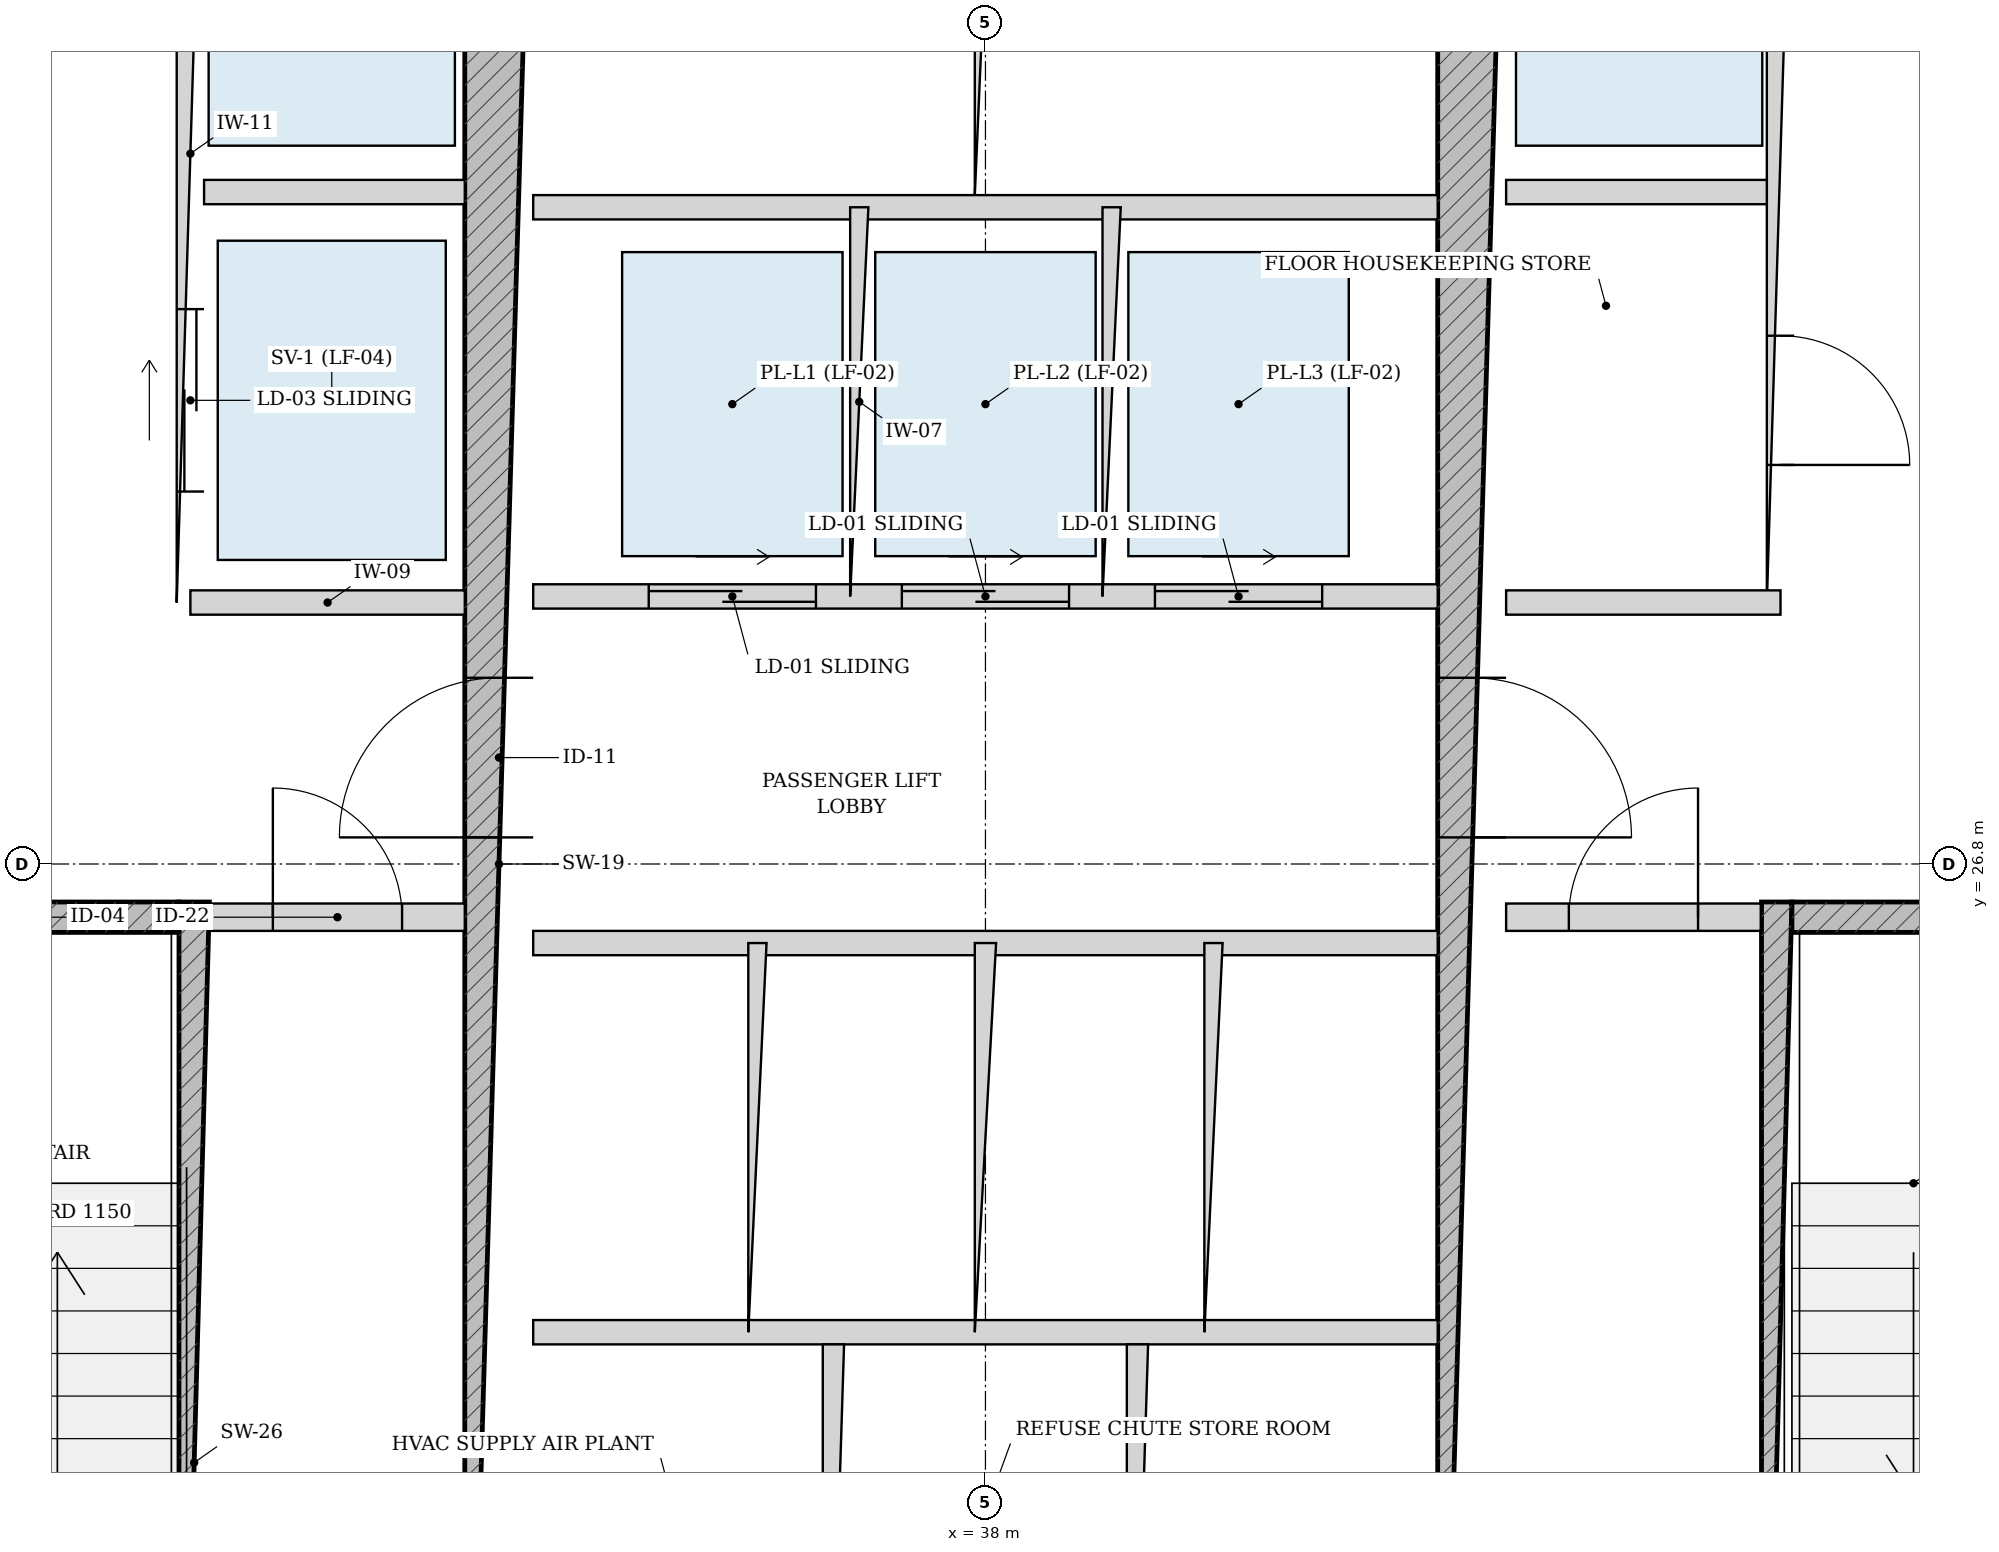
"""IFC4 building model, lengths in metres.
Left out: names, types, materials, properties, quantities, classifications, styles, units other than length and angle.
Written with IfcOpenShell. Run it as: python <this file> out.ifc"""

import sys

from ifc_helpers import new_model, si_unit, direction, frame, frame_2d, origin, place, context, subcontext, project, spatial, rectangle, extrude, source, transform, mapped, element, fill, save


model = new_model("IFC4")
c1 = context("Model", 3, precision=1e-05, world=origin(), true_north=direction((-0.2419218956, 0.970295726276)))
c2 = subcontext(c1, "Body", "Model", "MODEL_VIEW")
j1 = project(units=[si_unit("LENGTHUNIT", "METRE"), si_unit("PLANEANGLEUNIT", "RADIAN")], contexts=[c1])
p1 = place(None, origin())
s1 = spatial("IfcSite", under=j1, at=p1, CompositionType="ELEMENT")
p2 = place(p1, origin())
s2 = spatial("IfcBuilding", under=s1, at=p2, CompositionType="ELEMENT")
p3 = place(p2, frame((0.0, 0.0, 67.2)))
s3 = spatial("IfcBuildingStorey", under=s2, at=p3, CompositionType="ELEMENT", Elevation=67.2)
p4 = place(p3, frame((32.795, 19.175, 0.0), z_axis=(0.0, 0.0, 1.0), x_axis=(0.0, 1.0, 0.0)))
e1 = element("IfcWall", 1, at=p4, inside=s3, PredefinedType="SOLIDWALL", context=c2, shape_type="SweptSolid", body=[
    extrude(rectangle(XDim=7.375, YDim=0.2, at=frame_2d((3.688, 0.0))), origin(), (0.0, 0.0, 1.0), 3.32),
])
p5 = place(p3, frame((29.375, 26.45, 0.0), z_axis=(0.0, 0.0, 1.0), x_axis=(1.0, 0.0, 0.0)))
e2 = element("IfcWall", 2, at=p5, inside=s3, PredefinedType="SOLIDWALL", context=c2, shape_type="SweptSolid", body=[
    extrude(rectangle(XDim=3.32, YDim=0.2, at=frame_2d((1.66, 0.0))), origin(), (0.0, 0.0, 1.0), 3.32),
])
p6 = place(p5, frame((1.185, 0.0, 0.0)))
e3 = element("IfcOpeningElement", 3, at=p6, cuts=e2, PredefinedType="OPENING", context=c2, shape_type="SweptSolid", body=[
    extrude(rectangle(XDim=0.95, YDim=2.15, at=frame_2d((0.475, 1.075))), frame((0.0, 0.11, 0.0), z_axis=(0.0, -1.0, 0.0), x_axis=(1.0, 0.0, 0.0)), (0.0, 0.0, 1.0), 0.22),
])
p7 = place(p3, frame((43.205, 19.175, 0.0), z_axis=(0.0, 0.0, 1.0), x_axis=(0.0, 1.0, 0.0)))
e4 = element("IfcWall", 4, at=p7, inside=s3, PredefinedType="SOLIDWALL", context=c2, shape_type="SweptSolid", body=[
    extrude(rectangle(XDim=7.375, YDim=0.2, at=frame_2d((3.688, 0.0))), origin(), (0.0, 0.0, 1.0), 3.32),
])
p8 = place(p3, frame((43.305, 26.45, 0.0), z_axis=(0.0, 0.0, 1.0), x_axis=(1.0, 0.0, 0.0)))
e5 = element("IfcWall", 5, at=p8, inside=s3, PredefinedType="SOLIDWALL", context=c2, shape_type="SweptSolid", body=[
    extrude(rectangle(XDim=3.32, YDim=0.2, at=frame_2d((1.66, 0.0))), origin(), (0.0, 0.0, 1.0), 3.32),
])
p9 = place(p8, frame((1.185, 0.0, 0.0)))
e6 = element("IfcOpeningElement", 6, at=p9, cuts=e5, PredefinedType="OPENING", context=c2, shape_type="SweptSolid", body=[
    extrude(rectangle(XDim=0.95, YDim=2.15, at=frame_2d((0.475, 1.075))), frame((0.0, 0.11, 0.0), z_axis=(0.0, -1.0, 0.0), x_axis=(1.0, 0.0, 0.0)), (0.0, 0.0, 1.0), 0.22),
])
p10 = place(p3, frame((34.8, 19.175, 0.0), z_axis=(0.0, 0.0, 1.0), x_axis=(0.0, 1.0, 0.0)))
e7 = element("IfcWall", 7, at=p10, inside=s3, PredefinedType="SHEAR", context=c2, shape_type="SweptSolid", body=[
    extrude(rectangle(XDim=15.25, YDim=0.45, at=frame_2d((7.625, 0.0))), origin(), (0.0, 0.0, 1.0), 3.32),
])
p11 = place(p10, frame((7.8, 0.0, 0.0)))
e8 = element("IfcOpeningElement", 8, at=p11, cuts=e7, PredefinedType="OPENING", context=c2, shape_type="SweptSolid", body=[
    extrude(rectangle(XDim=1.05, YDim=2.15, at=frame_2d((0.525, 1.075))), frame((0.0, 0.235, 0.0), z_axis=(0.0, -1.0, 0.0), x_axis=(1.0, 0.0, 0.0)), (0.0, 0.0, 1.0), 0.47),
])
p12 = place(p3, frame((41.2, 19.175, 0.0), z_axis=(0.0, 0.0, 1.0), x_axis=(0.0, 1.0, 0.0)))
e9 = element("IfcWall", 9, at=p12, inside=s3, PredefinedType="SHEAR", context=c2, shape_type="SweptSolid", body=[
    extrude(rectangle(XDim=15.25, YDim=0.45, at=frame_2d((7.625, 0.0))), origin(), (0.0, 0.0, 1.0), 3.32),
])
p13 = place(p12, frame((7.8, 0.0, 0.0)))
e10 = element("IfcOpeningElement", 10, at=p13, cuts=e9, PredefinedType="OPENING", context=c2, shape_type="SweptSolid", body=[
    extrude(rectangle(XDim=1.05, YDim=2.15, at=frame_2d((0.525, 1.075))), frame((0.0, 0.235, 0.0), z_axis=(0.0, -1.0, 0.0), x_axis=(1.0, 0.0, 0.0)), (0.0, 0.0, 1.0), 0.47),
])
p14 = place(p3, frame((32.9, 26.45, 0.0), z_axis=(0.0, 0.0, 1.0), x_axis=(1.0, 0.0, 0.0)))
e11 = element("IfcWall", 11, at=p14, inside=s3, PredefinedType="PARTITIONING", context=c2, shape_type="SweptSolid", body=[
    extrude(rectangle(XDim=1.675, YDim=0.18, at=frame_2d((0.837, 0.0))), origin(), (0.0, 0.0, 1.0), 3.32),
])
p15 = place(p14, frame((0.413, 0.0, 0.0)))
e12 = element("IfcOpeningElement", 12, at=p15, cuts=e11, PredefinedType="OPENING", context=c2, shape_type="SweptSolid", body=[
    extrude(rectangle(XDim=0.85, YDim=2.1, at=frame_2d((0.425, 1.05))), frame((0.0, 0.1, 0.0), z_axis=(0.0, -1.0, 0.0), x_axis=(1.0, 0.0, 0.0)), (0.0, 0.0, 1.0), 0.2),
])
p16 = place(p3, frame((41.425, 26.45, 0.0), z_axis=(0.0, 0.0, 1.0), x_axis=(1.0, 0.0, 0.0)))
e13 = element("IfcWall", 13, at=p16, inside=s3, PredefinedType="PARTITIONING", context=c2, shape_type="SweptSolid", body=[
    extrude(rectangle(XDim=1.675, YDim=0.18, at=frame_2d((0.837, 0.0))), origin(), (0.0, 0.0, 1.0), 3.32),
])
p17 = place(p16, frame((0.413, 0.0, 0.0)))
e14 = element("IfcOpeningElement", 14, at=p17, cuts=e13, PredefinedType="OPENING", context=c2, shape_type="SweptSolid", body=[
    extrude(rectangle(XDim=0.85, YDim=2.1, at=frame_2d((0.425, 1.05))), frame((0.0, 0.1, 0.0), z_axis=(0.0, -1.0, 0.0), x_axis=(1.0, 0.0, 0.0)), (0.0, 0.0, 1.0), 0.2),
])
p18 = place(p3, frame((32.77, 28.52, 0.0), z_axis=(0.0, 0.0, 1.0), x_axis=(0.0, 1.0, 0.0)))
e15 = element("IfcWall", 15, at=p18, inside=s3, PredefinedType="PARTITIONING", context=c2, shape_type="SweptSolid", body=[
    extrude(rectangle(XDim=5.905, YDim=0.18, at=frame_2d((2.953, 0.0))), origin(), (0.0, 0.0, 1.0), 3.32),
])
p19 = place(p18, frame((3.655, 0.0, 0.0)))
e16 = element("IfcOpeningElement", 16, at=p19, cuts=e15, PredefinedType="OPENING", context=c2, shape_type="SweptSolid", body=[
    extrude(rectangle(XDim=1.15, YDim=2.2, at=frame_2d((0.575, 1.1))), frame((0.0, 0.1, 0.0), z_axis=(0.0, -1.0, 0.0), x_axis=(1.0, 0.0, 0.0)), (0.0, 0.0, 1.0), 0.2),
])
p20 = place(p18, frame((0.73, 0.0, 0.0)))
e17 = element("IfcOpeningElement", 17, at=p20, cuts=e15, PredefinedType="OPENING", context=c2, shape_type="SweptSolid", body=[
    extrude(rectangle(XDim=1.2, YDim=2.25, at=frame_2d((0.6, 1.125))), frame((0.0, 0.1, 0.0), z_axis=(0.0, -1.0, 0.0), x_axis=(1.0, 0.0, 0.0)), (0.0, 0.0, 1.0), 0.2),
])
p21 = place(p3, frame((32.86, 31.22, 0.0), z_axis=(0.0, 0.0, 1.0), x_axis=(1.0, 0.0, 0.0)))
e18 = element("IfcWall", 18, at=p21, inside=s3, PredefinedType="PARTITIONING", context=c2, shape_type="SweptSolid", body=[
    extrude(rectangle(XDim=1.715, YDim=0.16, at=frame_2d((0.857, 0.0))), origin(), (0.0, 0.0, 1.0), 3.32),
])
p22 = place(p3, frame((32.77, 28.52, 0.0), z_axis=(0.0, 0.0, 1.0), x_axis=(1.0, 0.0, 0.0)))
e19 = element("IfcWall", 19, at=p22, inside=s3, PredefinedType="PARTITIONING", context=c2, shape_type="SweptSolid", body=[
    extrude(rectangle(XDim=1.805, YDim=0.16, at=frame_2d((0.902, 0.0))), origin(), (0.0, 0.0, 1.0), 3.32),
])
p23 = place(p3, frame((43.23, 28.52, 0.0), z_axis=(0.0, 0.0, 1.0), x_axis=(0.0, 1.0, 0.0)))
e20 = element("IfcWall", 20, at=p23, inside=s3, PredefinedType="PARTITIONING", context=c2, shape_type="SweptSolid", body=[
    extrude(rectangle(XDim=5.905, YDim=0.18, at=frame_2d((2.953, 0.0))), origin(), (0.0, 0.0, 1.0), 3.32),
])
p24 = place(p23, frame((0.905, 0.0, 0.0)))
e21 = element("IfcOpeningElement", 21, at=p24, cuts=e20, PredefinedType="OPENING", context=c2, shape_type="SweptSolid", body=[
    extrude(rectangle(XDim=0.85, YDim=2.1, at=frame_2d((0.425, 1.05))), frame((0.0, 0.1, 0.0), z_axis=(0.0, -1.0, 0.0), x_axis=(1.0, 0.0, 0.0)), (0.0, 0.0, 1.0), 0.2),
])
p25 = place(p23, frame((3.655, 0.0, 0.0)))
e22 = element("IfcOpeningElement", 22, at=p25, cuts=e20, PredefinedType="OPENING", context=c2, shape_type="SweptSolid", body=[
    extrude(rectangle(XDim=1.15, YDim=2.2, at=frame_2d((0.575, 1.1))), frame((0.0, 0.1, 0.0), z_axis=(0.0, -1.0, 0.0), x_axis=(1.0, 0.0, 0.0)), (0.0, 0.0, 1.0), 0.2),
])
p26 = place(p3, frame((41.425, 31.22, 0.0), z_axis=(0.0, 0.0, 1.0), x_axis=(1.0, 0.0, 0.0)))
e23 = element("IfcWall", 23, at=p26, inside=s3, PredefinedType="PARTITIONING", context=c2, shape_type="SweptSolid", body=[
    extrude(rectangle(XDim=1.715, YDim=0.16, at=frame_2d((0.857, 0.0))), origin(), (0.0, 0.0, 1.0), 3.32),
])
p27 = place(p3, frame((41.425, 28.52, 0.0), z_axis=(0.0, 0.0, 1.0), x_axis=(1.0, 0.0, 0.0)))
e24 = element("IfcWall", 24, at=p27, inside=s3, PredefinedType="PARTITIONING", context=c2, shape_type="SweptSolid", body=[
    extrude(rectangle(XDim=1.805, YDim=0.16, at=frame_2d((0.902, 0.0))), origin(), (0.0, 0.0, 1.0), 3.32),
])
p28 = place(p3, frame((35.025, 28.56, 0.0), z_axis=(0.0, 0.0, 1.0), x_axis=(1.0, 0.0, 0.0)))
e25 = element("IfcWall", 25, at=p28, inside=s3, PredefinedType="PARTITIONING", context=c2, shape_type="SweptSolid", body=[
    extrude(rectangle(XDim=5.95, YDim=0.16, at=frame_2d((2.975, 0.0))), origin(), (0.0, 0.0, 1.0), 3.32),
])
p29 = place(p28, frame((0.76, 0.0, 0.0)))
e26 = element("IfcOpeningElement", 26, at=p29, cuts=e25, PredefinedType="OPENING", context=c2, shape_type="SweptSolid", body=[
    extrude(rectangle(XDim=1.1, YDim=2.2, at=frame_2d((0.55, 1.1))), frame((0.0, 0.09, 0.0), z_axis=(0.0, -1.0, 0.0), x_axis=(1.0, 0.0, 0.0)), (0.0, 0.0, 1.0), 0.18),
])
p30 = place(p28, frame((2.425, 0.0, 0.0)))
e27 = element("IfcOpeningElement", 27, at=p30, cuts=e25, PredefinedType="OPENING", context=c2, shape_type="SweptSolid", body=[
    extrude(rectangle(XDim=1.1, YDim=2.2, at=frame_2d((0.55, 1.1))), frame((0.0, 0.09, 0.0), z_axis=(0.0, -1.0, 0.0), x_axis=(1.0, 0.0, 0.0)), (0.0, 0.0, 1.0), 0.18),
])
p31 = place(p28, frame((4.09, 0.0, 0.0)))
e28 = element("IfcOpeningElement", 28, at=p31, cuts=e25, PredefinedType="OPENING", context=c2, shape_type="SweptSolid", body=[
    extrude(rectangle(XDim=1.1, YDim=2.2, at=frame_2d((0.55, 1.1))), frame((0.0, 0.09, 0.0), z_axis=(0.0, -1.0, 0.0), x_axis=(1.0, 0.0, 0.0)), (0.0, 0.0, 1.0), 0.18),
])
p32 = place(p3, frame((35.025, 31.12, 0.0), z_axis=(0.0, 0.0, 1.0), x_axis=(1.0, 0.0, 0.0)))
e29 = element("IfcWall", 29, at=p32, inside=s3, PredefinedType="PARTITIONING", context=c2, shape_type="SweptSolid", body=[
    extrude(rectangle(XDim=5.95, YDim=0.16, at=frame_2d((2.975, 0.0))), origin(), (0.0, 0.0, 1.0), 3.32),
])
for number, where, z_axis, x_axis in (
    (30, (37.17, 28.56, 0.0), (0.0, 0.0, 1.0), (0.0, 1.0, 0.0)),
    (31, (38.83, 28.56, 0.0), (0.0, 0.0, 1.0), (0.0, 1.0, 0.0)),
):
    element("IfcWall", number, at=place(p3, frame(where, z_axis=z_axis, x_axis=x_axis)), inside=s3, PredefinedType="PARTITIONING", context=c2, shape_type="SweptSolid", body=[
        extrude(rectangle(XDim=2.56, YDim=0.12, at=frame_2d((1.28, 0.0))), origin(), (0.0, 0.0, 1.0), 3.32),
    ])
p33 = place(p3, frame((38.0, 31.2, 0.0), z_axis=(0.0, 0.0, 1.0), x_axis=(0.0, 1.0, 0.0)))
e32 = element("IfcWall", 32, at=p33, inside=s3, PredefinedType="PARTITIONING", context=c2, shape_type="SweptSolid", body=[
    extrude(rectangle(XDim=3.225, YDim=0.14, at=frame_2d((1.613, 0.0))), origin(), (0.0, 0.0, 1.0), 3.32),
])
for number, where, z_axis, x_axis in (
    (33, (35.025, 26.28, 0.0), (0.0, 0.0, 1.0), (1.0, 0.0, 0.0)),
    (34, (35.025, 23.72, 0.0), (0.0, 0.0, 1.0), (1.0, 0.0, 0.0)),
):
    element("IfcWall", number, at=place(p3, frame(where, z_axis=z_axis, x_axis=x_axis)), inside=s3, PredefinedType="PARTITIONING", context=c2, shape_type="SweptSolid", body=[
        extrude(rectangle(XDim=5.95, YDim=0.16, at=frame_2d((2.975, 0.0))), origin(), (0.0, 0.0, 1.0), 3.32),
    ])
p34 = place(p3, frame((36.5, 23.72, 0.0), z_axis=(0.0, 0.0, 1.0), x_axis=(0.0, 1.0, 0.0)))
e35 = element("IfcWall", 35, at=p34, inside=s3, PredefinedType="PARTITIONING", context=c2, shape_type="SweptSolid", body=[
    extrude(rectangle(XDim=2.56, YDim=0.12, at=frame_2d((1.28, 0.0))), origin(), (0.0, 0.0, 1.0), 3.32),
])
p35 = place(p3, frame((38.0, 23.72, 0.0), z_axis=(0.0, 0.0, 1.0), x_axis=(0.0, 1.0, 0.0)))
e36 = element("IfcWall", 36, at=p35, inside=s3, PredefinedType="PARTITIONING", context=c2, shape_type="SweptSolid", body=[
    extrude(rectangle(XDim=2.56, YDim=0.14, at=frame_2d((1.28, 0.0))), origin(), (0.0, 0.0, 1.0), 3.32),
])
p36 = place(p3, frame((39.5, 23.72, 0.0), z_axis=(0.0, 0.0, 1.0), x_axis=(0.0, 1.0, 0.0)))
e37 = element("IfcWall", 37, at=p36, inside=s3, PredefinedType="PARTITIONING", context=c2, shape_type="SweptSolid", body=[
    extrude(rectangle(XDim=2.56, YDim=0.12, at=frame_2d((1.28, 0.0))), origin(), (0.0, 0.0, 1.0), 3.32),
])
p37 = place(p3, frame((37.0, 19.175, 0.0), z_axis=(0.0, 0.0, 1.0), x_axis=(0.0, 1.0, 0.0)))
e38 = element("IfcWall", 38, at=p37, inside=s3, PredefinedType="PARTITIONING", context=c2, shape_type="SweptSolid", body=[
    extrude(rectangle(XDim=4.465, YDim=0.14, at=frame_2d((2.232, 0.0))), origin(), (0.0, 0.0, 1.0), 3.32),
])
p38 = place(p37, frame((1.808, 0.0, 0.0)))
e39 = element("IfcOpeningElement", 39, at=p38, cuts=e38, PredefinedType="OPENING", context=c2, shape_type="SweptSolid", body=[
    extrude(rectangle(XDim=0.85, YDim=2.1, at=frame_2d((0.425, 1.05))), frame((0.0, 0.08, 0.0), z_axis=(0.0, -1.0, 0.0), x_axis=(1.0, 0.0, 0.0)), (0.0, 0.0, 1.0), 0.16),
])
p39 = place(p3, frame((39.0, 19.175, 0.0), z_axis=(0.0, 0.0, 1.0), x_axis=(0.0, 1.0, 0.0)))
e40 = element("IfcWall", 40, at=p39, inside=s3, PredefinedType="PARTITIONING", context=c2, shape_type="SweptSolid", body=[
    extrude(rectangle(XDim=4.465, YDim=0.14, at=frame_2d((2.232, 0.0))), origin(), (0.0, 0.0, 1.0), 3.32),
])
p40 = place(p39, frame((1.808, 0.0, 0.0)))
e41 = element("IfcOpeningElement", 41, at=p40, cuts=e40, PredefinedType="OPENING", context=c2, shape_type="SweptSolid", body=[
    extrude(rectangle(XDim=0.85, YDim=2.1, at=frame_2d((0.425, 1.05))), frame((0.0, 0.08, 0.0), z_axis=(0.0, -1.0, 0.0), x_axis=(1.0, 0.0, 0.0)), (0.0, 0.0, 1.0), 0.16),
])
m1 = source(origin(), c2, "Body", "SweptSolid", [
    extrude(rectangle(XDim=1.05, YDim=2.15, at=frame_2d((0.525, 1.075))), frame((0.0, 0.025, 0.0), z_axis=(0.0, -1.0, 0.0), x_axis=(1.0, 0.0, 0.0)), (0.0, 0.0, 1.0), 0.05),
])
p41 = place(p11, origin())
e42 = element("IfcDoor", 42, at=p41, inside=s3, OperationType="SINGLE_SWING_LEFT", PredefinedType="DOOR", context=c2, shape_type="MappedRepresentation", body=[
    mapped(m1, transform((0.0, 0.0, 0.0), scale=1.0)),
])
fill(e8, e42)
p42 = place(p13, frame((1.05, 0.0, 0.0), z_axis=(0.0, 0.0, 1.0), x_axis=(-1.0, 0.0, 0.0)))
e43 = element("IfcDoor", 43, at=p42, inside=s3, OperationType="SINGLE_SWING_RIGHT", PredefinedType="DOOR", context=c2, shape_type="MappedRepresentation", body=[
    mapped(m1, transform((0.0, 0.0, 0.0), scale=1.0)),
])
fill(e10, e43)
m2 = source(origin(), c2, "Body", "SweptSolid", [
    extrude(rectangle(XDim=0.85, YDim=2.1, at=frame_2d((0.425, 1.05))), frame((0.0, 0.025, 0.0), z_axis=(0.0, -1.0, 0.0), x_axis=(1.0, 0.0, 0.0)), (0.0, 0.0, 1.0), 0.05),
])
p43 = place(p15, origin())
e44 = element("IfcDoor", 44, at=p43, inside=s3, OperationType="SINGLE_SWING_LEFT", PredefinedType="DOOR", context=c2, shape_type="MappedRepresentation", body=[
    mapped(m2, transform((0.0, 0.0, 0.0), scale=1.0)),
])
fill(e12, e44)
p44 = place(p17, origin())
e45 = element("IfcDoor", 45, at=p44, inside=s3, OperationType="SINGLE_SWING_RIGHT", PredefinedType="DOOR", context=c2, shape_type="MappedRepresentation", body=[
    mapped(m2, transform((0.0, 0.0, 0.0), scale=1.0)),
])
fill(e14, e45)
p45 = place(p24, frame((0.85, 0.0, 0.0), z_axis=(0.0, 0.0, 1.0), x_axis=(-1.0, 0.0, 0.0)))
e46 = element("IfcDoor", 46, at=p45, inside=s3, OperationType="SINGLE_SWING_RIGHT", PredefinedType="DOOR", context=c2, shape_type="MappedRepresentation", body=[
    mapped(m2, transform((0.0, 0.0, 0.0), scale=1.0)),
])
fill(e21, e46)
m3 = source(origin(), c2, "Body", "SweptSolid", [
    extrude(rectangle(XDim=1.2, YDim=2.25, at=frame_2d((0.6, 1.125))), frame((0.0, 0.025, 0.0), z_axis=(0.0, -1.0, 0.0), x_axis=(1.0, 0.0, 0.0)), (0.0, 0.0, 1.0), 0.05),
])
p46 = place(p20, origin())
e47 = element("IfcDoor", 47, at=p46, inside=s3, OperationType="DOUBLE_DOOR_SLIDING", PredefinedType="DOOR", context=c2, shape_type="MappedRepresentation", body=[
    mapped(m3, transform((0.0, 0.0, 0.0), scale=1.0)),
])
fill(e17, e47)
m4 = source(origin(), c2, "Body", "SweptSolid", [
    extrude(rectangle(XDim=1.1, YDim=2.2, at=frame_2d((0.55, 1.1))), frame((0.0, 0.025, 0.0), z_axis=(0.0, -1.0, 0.0), x_axis=(1.0, 0.0, 0.0)), (0.0, 0.0, 1.0), 0.05),
])
p47 = place(p29, origin())
e48 = element("IfcDoor", 48, at=p47, inside=s3, OperationType="DOUBLE_DOOR_SLIDING", PredefinedType="DOOR", context=c2, shape_type="MappedRepresentation", body=[
    mapped(m4, transform((0.0, 0.0, 0.0), scale=1.0)),
])
fill(e26, e48)
p48 = place(p30, origin())
e49 = element("IfcDoor", 49, at=p48, inside=s3, OperationType="DOUBLE_DOOR_SLIDING", PredefinedType="DOOR", context=c2, shape_type="MappedRepresentation", body=[
    mapped(m4, transform((0.0, 0.0, 0.0), scale=1.0)),
])
fill(e27, e49)
p49 = place(p31, origin())
e50 = element("IfcDoor", 50, at=p49, inside=s3, OperationType="DOUBLE_DOOR_SLIDING", PredefinedType="DOOR", context=c2, shape_type="MappedRepresentation", body=[
    mapped(m4, transform((0.0, 0.0, 0.0), scale=1.0)),
])
fill(e28, e50)
save(model, sys.argv[1])
